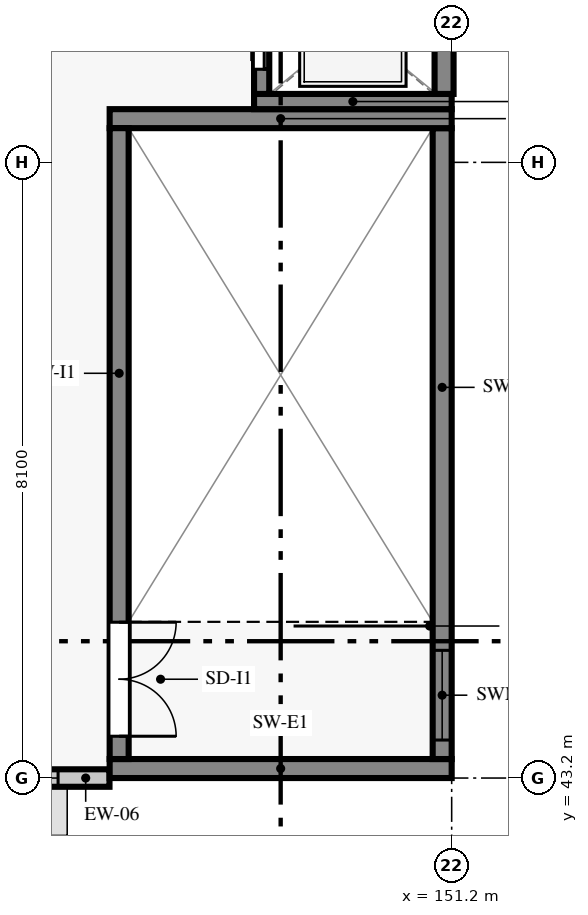
"""IFC4 building model, lengths in metres.
Left out: names, types, materials, properties, quantities, classifications, styles, units other than length and angle.
Written with IfcOpenShell. Run it as: python <this file> out.ifc"""

import sys

from ifc_helpers import new_model, si_unit, direction, frame, frame_2d, origin, place, context, subcontext, project, spatial, rectangle, extrude, element, fill, save


model = new_model("IFC4")
c1 = context("Model", 3, precision=1e-05, world=origin(), true_north=direction((0.0, 1.0)))
c2 = subcontext(c1, "Body", "Model", "MODEL_VIEW")
j1 = project(units=[si_unit("LENGTHUNIT", "METRE"), si_unit("PLANEANGLEUNIT", "RADIAN")], contexts=[c1])
p1 = place(None, origin())
s1 = spatial("IfcSite", under=j1, at=p1, CompositionType="ELEMENT")
p2 = place(p1, origin())
s2 = spatial("IfcBuilding", under=s1, at=p2, CompositionType="ELEMENT")
p3 = place(p2, frame((0.0, 0.0, 9.6)))
s3 = spatial("IfcBuildingStorey", under=s2, at=p3, CompositionType="ELEMENT", Elevation=9.6)
p4 = place(p3, frame((144.295, 43.2, 0.0), z_axis=(0.0, 0.0, 1.0), x_axis=(1.0, 0.0, 0.0)))
e1 = element("IfcWall", 1, at=p4, inside=s3, PredefinedType="STANDARD", context=c2, shape_type="SweptSolid", body=[
    extrude(rectangle(XDim=2.403, YDim=0.23, at=frame_2d((1.202, 0.0))), origin(), (0.0, 0.0, 1.0), 4.2),
])
p5 = place(p4, frame((0.677, 0.0, 0.9)))
e2 = element("IfcOpeningElement", 2, at=p5, cuts=e1, PredefinedType="OPENING", context=c2, shape_type="SweptSolid", body=[
    extrude(rectangle(XDim=1.05, YDim=1.3, at=frame_2d((0.525, 0.65))), frame((0.0, 0.125, 0.0), z_axis=(0.0, -1.0, 0.0), x_axis=(1.0, 0.0, 0.0)), (0.0, 0.0, 1.0), 0.25),
])
p6 = place(p3, frame((146.7, 43.325, 0.0), z_axis=(0.0, 0.0, 1.0), x_axis=(1.0, 0.0, 0.0)))
e3 = element("IfcWall", 3, at=p6, inside=s3, PredefinedType="SHEAR", context=c2, shape_type="SweptSolid", body=[
    extrude(rectangle(XDim=4.5, YDim=0.25, at=frame_2d((2.25, 0.0))), origin(), (0.0, 0.0, 1.0), 4.2),
])
p7 = place(p3, frame((151.075, 43.45, 0.0), z_axis=(0.0, 0.0, 1.0), x_axis=(0.0, 1.0, 0.0)))
e4 = element("IfcWall", 4, at=p7, inside=s3, PredefinedType="SHEAR", context=c2, shape_type="SweptSolid", body=[
    extrude(rectangle(XDim=8.3, YDim=0.25, at=frame_2d((4.15, 0.0))), origin(), (0.0, 0.0, 1.0), 4.2),
])
p8 = place(p7, frame((0.25, 0.0, 0.92)))
e5 = element("IfcOpeningElement", 5, at=p8, cuts=e4, PredefinedType="OPENING", context=c2, shape_type="SweptSolid", body=[
    extrude(rectangle(XDim=1.18, YDim=1.48, at=frame_2d((0.59, 0.74))), frame((0.0, 0.135, 0.0), z_axis=(0.0, -1.0, 0.0), x_axis=(1.0, 0.0, 0.0)), (0.0, 0.0, 1.0), 0.27),
])
p9 = place(p3, frame((151.2, 51.875, 0.0), z_axis=(0.0, 0.0, 1.0), x_axis=(-1.0, 0.0, 0.0)))
e6 = element("IfcWall", 6, at=p9, inside=s3, PredefinedType="SHEAR", context=c2, shape_type="SweptSolid", body=[
    extrude(rectangle(XDim=4.5, YDim=0.25, at=frame_2d((2.25, 0.0))), origin(), (0.0, 0.0, 1.0), 4.2),
])
p10 = place(p3, frame((146.825, 51.75, 0.0), z_axis=(0.0, 0.0, 1.0), x_axis=(0.0, -1.0, 0.0)))
e7 = element("IfcWall", 7, at=p10, inside=s3, PredefinedType="SHEAR", context=c2, shape_type="SweptSolid", body=[
    extrude(rectangle(XDim=8.3, YDim=0.25, at=frame_2d((4.15, 0.0))), origin(), (0.0, 0.0, 1.0), 4.2),
])
p11 = place(p10, frame((6.5, 0.0, 0.0)))
e8 = element("IfcOpeningElement", 8, at=p11, cuts=e7, PredefinedType="OPENING", context=c2, shape_type="SweptSolid", body=[
    extrude(rectangle(XDim=1.5, YDim=2.15, at=frame_2d((0.75, 1.075))), frame((0.0, 0.135, 0.0), z_axis=(0.0, -1.0, 0.0), x_axis=(1.0, 0.0, 0.0)), (0.0, 0.0, 1.0), 0.27),
])
p12 = place(p3, frame((148.6, 52.1, 0.0), z_axis=(0.0, 0.0, 1.0), x_axis=(1.0, 0.0, 0.0)))
e9 = element("IfcWall", 9, at=p12, inside=s3, PredefinedType="SHEAR", context=c2, shape_type="SweptSolid", body=[
    extrude(rectangle(XDim=2.6, YDim=0.2, at=frame_2d((1.3, 0.0))), origin(), (0.0, 0.0, 1.0), 4.2),
])
p13 = place(p3, frame((151.1, 52.2, 0.0), z_axis=(0.0, 0.0, 1.0), x_axis=(0.0, 1.0, 0.0)))
e10 = element("IfcWall", 10, at=p13, inside=s3, PredefinedType="SHEAR", context=c2, shape_type="SweptSolid", body=[
    extrude(rectangle(XDim=1.8, YDim=0.25, at=frame_2d((0.9, 0.0))), origin(), (0.0, 0.0, 1.0), 4.2),
])
p14 = place(p3, frame((148.7, 54.0, 0.0), z_axis=(0.0, 0.0, 1.0), x_axis=(0.0, -1.0, 0.0)))
e11 = element("IfcWall", 11, at=p14, inside=s3, PredefinedType="SHEAR", context=c2, shape_type="SweptSolid", body=[
    extrude(rectangle(XDim=1.8, YDim=0.2, at=frame_2d((0.9, 0.0))), origin(), (0.0, 0.0, 1.0), 4.2),
])
p15 = place(p14, frame((0.325, 0.0, 0.0)))
e12 = element("IfcOpeningElement", 12, at=p15, cuts=e11, PredefinedType="OPENING", context=c2, shape_type="SweptSolid", body=[
    extrude(rectangle(XDim=1.15, YDim=2.15, at=frame_2d((0.575, 1.075))), frame((0.0, 0.11, 0.0), z_axis=(0.0, -1.0, 0.0), x_axis=(1.0, 0.0, 0.0)), (0.0, 0.0, 1.0), 0.22),
])
p16 = place(p5, origin())
e13 = element("IfcWindow", 13, at=p16, inside=s3, PartitioningType="SINGLE_PANEL", PredefinedType="WINDOW", context=c2, shape_type="SweptSolid", body=[
    extrude(rectangle(XDim=1.05, YDim=1.3, at=frame_2d((0.525, 0.65))), frame((0.0, 0.03, 0.0), z_axis=(0.0, -1.0, 0.0), x_axis=(1.0, 0.0, 0.0)), (0.0, 0.0, 1.0), 0.06),
])
fill(e2, e13)
p17 = place(p8, origin())
e14 = element("IfcWindow", 14, at=p17, inside=s3, PartitioningType="SINGLE_PANEL", PredefinedType="WINDOW", context=c2, shape_type="SweptSolid", body=[
    extrude(rectangle(XDim=1.18, YDim=1.48, at=frame_2d((0.59, 0.74))), frame((0.0, 0.03, 0.0), z_axis=(0.0, -1.0, 0.0), x_axis=(1.0, 0.0, 0.0)), (0.0, 0.0, 1.0), 0.06),
])
fill(e5, e14)
p18 = place(p11, origin())
e15 = element("IfcDoor", 15, at=p18, inside=s3, OperationType="DOUBLE_DOOR_SINGLE_SWING", PredefinedType="DOOR", context=c2, shape_type="SweptSolid", body=[
    extrude(rectangle(XDim=1.5, YDim=2.15, at=frame_2d((0.75, 1.075))), frame((0.0, 0.025, 0.0), z_axis=(0.0, -1.0, 0.0), x_axis=(1.0, 0.0, 0.0)), (0.0, 0.0, 1.0), 0.05),
])
fill(e8, e15)
p19 = place(p15, frame((1.15, 0.0, 0.0), z_axis=(0.0, 0.0, 1.0), x_axis=(-1.0, 0.0, 0.0)))
e16 = element("IfcDoor", 16, at=p19, inside=s3, OperationType="DOUBLE_DOOR_SLIDING", PredefinedType="DOOR", context=c2, shape_type="SweptSolid", body=[
    extrude(rectangle(XDim=1.15, YDim=2.15, at=frame_2d((0.575, 1.075))), frame((0.0, 0.025, 0.0), z_axis=(0.0, -1.0, 0.0), x_axis=(1.0, 0.0, 0.0)), (0.0, 0.0, 1.0), 0.05),
])
fill(e12, e16)
save(model, sys.argv[1])
